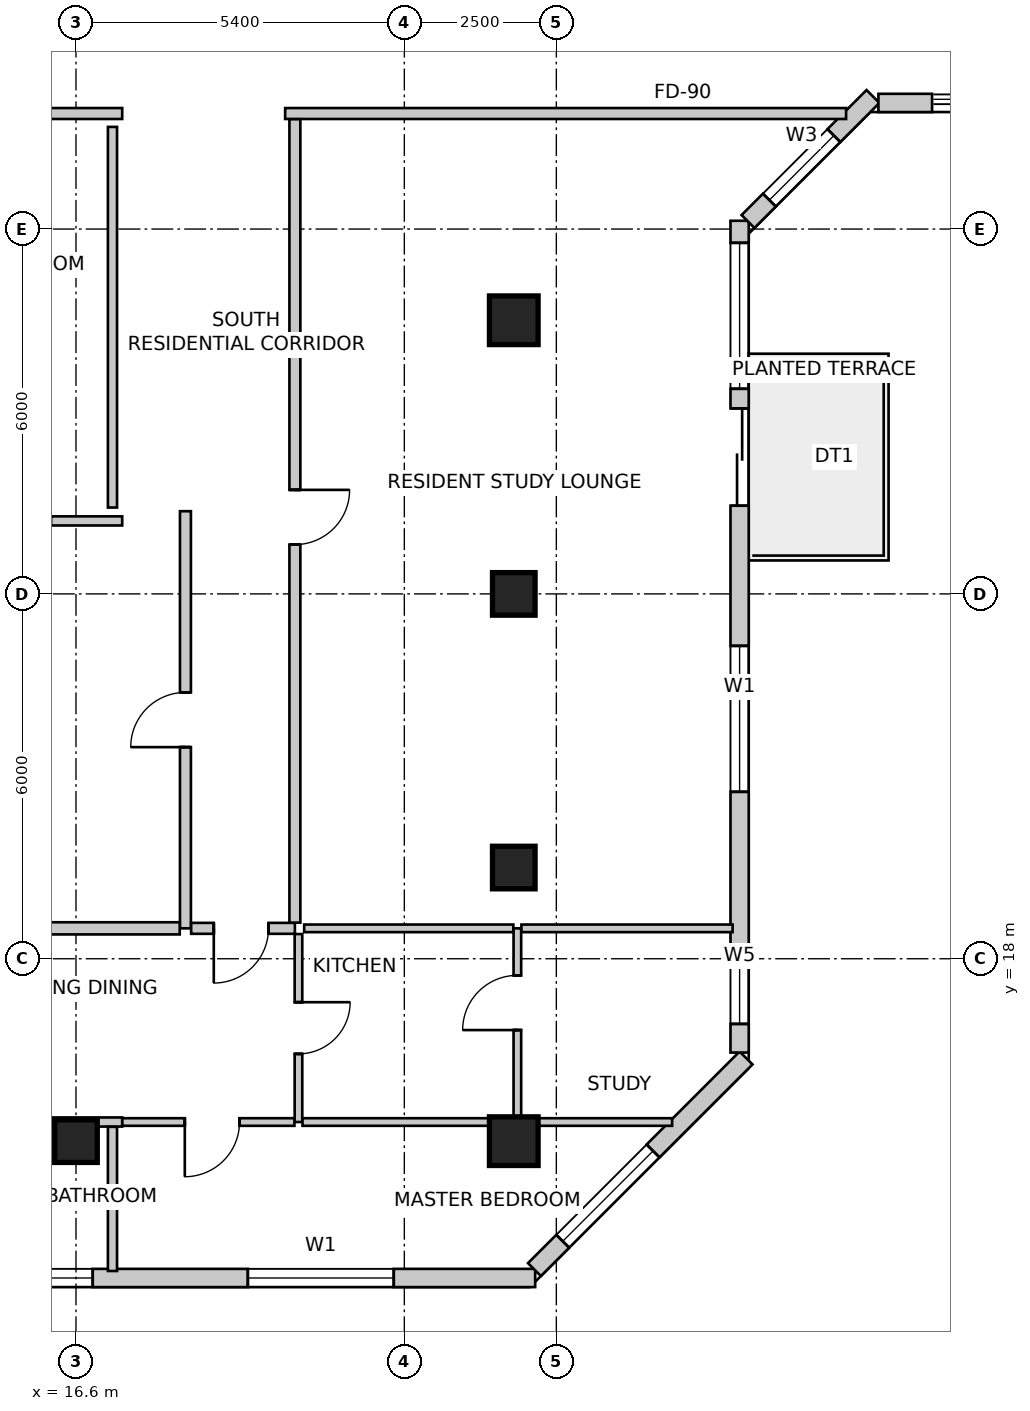
"""IFC4 building model, lengths in metres.
Left out: names, types, materials, properties, quantities, classifications, styles, units other than length and angle.
Written with IfcOpenShell. Run it as: python <this file> out.ifc"""

import sys

from ifc_helpers import new_model, si_unit, direction, frame, frame_2d, origin, origin_2d, place, context, subcontext, project, spatial, rectangle, extrude, source, transform, mapped, element, fill, save


model = new_model("IFC4")
c1 = context("Model", 3, precision=1e-05, world=origin(), true_north=direction((0.0, 1.0)))
c2 = subcontext(c1, "Body", "Model", "MODEL_VIEW")
j1 = project(units=[si_unit("LENGTHUNIT", "METRE"), si_unit("PLANEANGLEUNIT", "RADIAN")], contexts=[c1])
p1 = place(None, origin())
s1 = spatial("IfcSite", under=j1, at=p1, CompositionType="ELEMENT")
p2 = place(p1, origin())
s2 = spatial("IfcBuilding", under=s1, at=p2, CompositionType="ELEMENT")
p3 = place(p2, frame((0.0, 0.0, 200.9)))
s3 = spatial("IfcBuildingStorey", under=s2, at=p3, CompositionType="ELEMENT", Elevation=200.9)
m1 = source(origin(), c2, "Body", "SweptSolid", [
    extrude(rectangle(XDim=0.8, YDim=0.8, at=origin_2d()), origin(), (0.0, 0.0, 1.0), 3.5),
])
p4 = place(p3, frame((23.8, 28.5, 0.0), z_axis=(0.0, 0.0, 1.0), x_axis=(1.0, 0.0, 0.0)))
e1 = element("IfcColumn", 1, at=p4, inside=s3, PredefinedType="COLUMN", context=c2, shape_type="MappedRepresentation", body=[
    mapped(m1, transform((0.0, 0.0, 0.0), scale=1.0)),
])
m2 = source(origin(), c2, "Body", "SweptSolid", [
    extrude(rectangle(XDim=0.7, YDim=0.7, at=origin_2d()), origin(), (0.0, 0.0, 1.0), 3.5),
])
for number, where, z_axis, x_axis in (
    (2, (23.8, 24.0, 0.0), (0.0, 0.0, 1.0), (1.0, 0.0, 0.0)),
    (3, (23.8, 19.5, 0.0), (0.0, 0.0, 1.0), (1.0, 0.0, 0.0)),
):
    element("IfcColumn", number, at=place(p3, frame(where, z_axis=z_axis, x_axis=x_axis)), inside=s3, PredefinedType="COLUMN", context=c2, shape_type="MappedRepresentation", body=[
        mapped(m2, transform((0.0, 0.0, 0.0), scale=1.0)),
    ])
p5 = place(p3, frame((23.8, 15.0, 0.0), z_axis=(0.0, 0.0, 1.0), x_axis=(1.0, 0.0, 0.0)))
e4 = element("IfcColumn", 4, at=p5, inside=s3, PredefinedType="COLUMN", context=c2, shape_type="MappedRepresentation", body=[
    mapped(m1, transform((0.0, 0.0, 0.0), scale=1.0)),
])
p6 = place(p3, frame((16.6, 15.0, 0.0), z_axis=(0.0, 0.0, 1.0), x_axis=(1.0, 0.0, 0.0)))
e5 = element("IfcColumn", 5, at=p6, inside=s3, PredefinedType="COLUMN", context=c2, shape_type="MappedRepresentation", body=[
    mapped(m2, transform((0.0, 0.0, 0.0), scale=1.0)),
])
p7 = place(p3, frame((13.51, 12.75, 0.0), z_axis=(0.0, 0.0, 1.0), x_axis=(1.0, 0.0, 0.0)))
e6 = element("IfcWall", 6, at=p7, inside=s3, PredefinedType="SOLIDWALL", context=c2, shape_type="SweptSolid", body=[
    extrude(rectangle(XDim=10.642, YDim=0.3, at=frame_2d((5.321, 0.0))), origin(), (0.0, 0.0, 1.0), 3.25),
])
m3 = source(origin(), c2, "Body", "SweptSolid", [
    extrude(rectangle(XDim=2.1, YDim=2.0, at=frame_2d((1.05, 1.0))), frame((0.0, 0.16, 0.0), z_axis=(0.0, -1.0, 0.0), x_axis=(1.0, 0.0, 0.0)), (0.0, 0.0, 1.0), 0.32),
])
p8 = place(p7, frame((1.265, 0.0, 0.85)))
e7 = element("IfcOpeningElement", 7, at=p8, cuts=e6, PredefinedType="OPENING", context=c2, shape_type="MappedRepresentation", body=[
    mapped(m3, transform((0.0, 0.0, 0.0), scale=1.0)),
])
m4 = source(origin(), c2, "Body", "SweptSolid", [
    extrude(rectangle(XDim=2.4, YDim=2.2, at=frame_2d((1.2, 1.1))), frame((0.0, 0.16, 0.0), z_axis=(0.0, -1.0, 0.0), x_axis=(1.0, 0.0, 0.0)), (0.0, 0.0, 1.0), 0.32),
])
p9 = place(p7, frame((5.916, 0.0, 0.85)))
e8 = element("IfcOpeningElement", 8, at=p9, cuts=e6, PredefinedType="OPENING", context=c2, shape_type="MappedRepresentation", body=[
    mapped(m4, transform((0.0, 0.0, 0.0), scale=1.0)),
])
p10 = place(p3, frame((24.14, 12.888, 0.0), z_axis=(0.0, 0.0, 1.0), x_axis=(0.707106781187, 0.707106781187, 0.0)))
e9 = element("IfcWall", 9, at=p10, inside=s3, PredefinedType="SOLIDWALL", context=c2, shape_type="SweptSolid", body=[
    extrude(rectangle(XDim=4.922, YDim=0.3, at=frame_2d((2.461, 0.0))), origin(), (0.0, 0.0, 1.0), 3.25),
])
p11 = place(p10, frame((0.659, 0.0, 0.85)))
e10 = element("IfcOpeningElement", 10, at=p11, cuts=e9, PredefinedType="OPENING", context=c2, shape_type="MappedRepresentation", body=[
    mapped(m3, transform((0.0, 0.0, 0.0), scale=1.0)),
])
p12 = place(p3, frame((27.514, 16.457, 0.0), z_axis=(0.0, 0.0, 1.0), x_axis=(0.0, 1.0, 0.0)))
e11 = element("IfcWall", 11, at=p12, inside=s3, PredefinedType="SOLIDWALL", context=c2, shape_type="SweptSolid", body=[
    extrude(rectangle(XDim=13.679, YDim=0.3, at=frame_2d((6.839, 0.0))), origin(), (0.0, 0.0, 1.0), 3.25),
])
m5 = source(origin(), c2, "Body", "SweptSolid", [
    extrude(rectangle(XDim=1.6, YDim=2.15, at=frame_2d((0.8, 1.075))), frame((0.0, 0.16, 0.0), z_axis=(0.0, -1.0, 0.0), x_axis=(1.0, 0.0, 0.0)), (0.0, 0.0, 1.0), 0.32),
])
p13 = place(p12, frame((8.993, 0.0, 0.0)))
e12 = element("IfcOpeningElement", 12, at=p13, cuts=e11, PredefinedType="OPENING", context=c2, shape_type="MappedRepresentation", body=[
    mapped(m5, transform((0.0, 0.0, 0.0), scale=1.0)),
])
m6 = source(origin(), c2, "Body", "SweptSolid", [
    extrude(rectangle(XDim=1.2, YDim=1.6, at=frame_2d((0.6, 0.8))), frame((0.0, 0.16, 0.0), z_axis=(0.0, -1.0, 0.0), x_axis=(1.0, 0.0, 0.0)), (0.0, 0.0, 1.0), 0.32),
])
p14 = place(p12, frame((0.471, 0.0, 0.85)))
e13 = element("IfcOpeningElement", 13, at=p14, cuts=e11, PredefinedType="OPENING", context=c2, shape_type="MappedRepresentation", body=[
    mapped(m6, transform((0.0, 0.0, 0.0), scale=1.0)),
])
p15 = place(p12, frame((4.288, 0.0, 0.85)))
e14 = element("IfcOpeningElement", 14, at=p15, cuts=e11, PredefinedType="OPENING", context=c2, shape_type="MappedRepresentation", body=[
    mapped(m4, transform((0.0, 0.0, 0.0), scale=1.0)),
])
p16 = place(p12, frame((10.916, 0.0, 0.85)))
e15 = element("IfcOpeningElement", 15, at=p16, cuts=e11, PredefinedType="OPENING", context=c2, shape_type="MappedRepresentation", body=[
    mapped(m4, transform((0.0, 0.0, 0.0), scale=1.0)),
])
p17 = place(p3, frame((27.652, 30.124, 0.0), z_axis=(0.0, 0.0, 1.0), x_axis=(0.707064797706, 0.707148762175, 0.0)))
e16 = element("IfcWall", 16, at=p17, inside=s3, PredefinedType="SOLIDWALL", context=c2, shape_type="SweptSolid", body=[
    extrude(rectangle(XDim=2.908, YDim=0.3, at=frame_2d((1.454, 0.0))), origin(), (0.0, 0.0, 1.0), 3.25),
])
m7 = source(origin(), c2, "Body", "SweptSolid", [
    extrude(rectangle(XDim=1.5, YDim=1.8, at=frame_2d((0.75, 0.9))), frame((0.0, 0.16, 0.0), z_axis=(0.0, -1.0, 0.0), x_axis=(1.0, 0.0, 0.0)), (0.0, 0.0, 1.0), 0.32),
])
p18 = place(p17, frame((0.498, 0.0, 0.85)))
e17 = element("IfcOpeningElement", 17, at=p18, cuts=e16, PredefinedType="OPENING", context=c2, shape_type="MappedRepresentation", body=[
    mapped(m7, transform((0.0, 0.0, 0.0), scale=1.0)),
])
p19 = place(p3, frame((29.797, 32.074, 0.0), z_axis=(0.0, 0.0, 1.0), x_axis=(1.0, 0.0, 0.0)))
e18 = element("IfcWall", 18, at=p19, inside=s3, PredefinedType="SOLIDWALL", context=c2, shape_type="SweptSolid", body=[
    extrude(rectangle(XDim=0.882, YDim=0.3, at=frame_2d((0.441, 0.0))), origin(), (0.0, 0.0, 1.0), 3.25),
])
p20 = place(p3, frame((17.36, 31.9, 0.0), z_axis=(0.0, 0.0, 1.0), x_axis=(-1.0, 0.0, 0.0)))
e19 = element("IfcWall", 19, at=p20, inside=s3, PredefinedType="PARTITIONING", context=c2, shape_type="SweptSolid", body=[
    extrude(rectangle(XDim=3.07, YDim=0.18, at=frame_2d((1.535, 0.0))), origin(), (0.0, 0.0, 1.0), 2.934),
])
p21 = place(p3, frame((29.265, 31.9, 0.0), z_axis=(0.0, 0.0, 1.0), x_axis=(-1.0, 0.0, 0.0)))
e20 = element("IfcWall", 20, at=p21, inside=s3, PredefinedType="PARTITIONING", context=c2, shape_type="SweptSolid", body=[
    extrude(rectangle(XDim=9.225, YDim=0.18, at=frame_2d((4.613, 0.0))), origin(), (0.0, 0.0, 1.0), 2.934),
])
p22 = place(p3, frame((18.4, 18.5, 0.0), z_axis=(0.0, 0.0, 1.0), x_axis=(0.0, 1.0, 0.0)))
e21 = element("IfcWall", 21, at=p22, inside=s3, PredefinedType="PARTITIONING", context=c2, shape_type="SweptSolid", body=[
    extrude(rectangle(XDim=6.86, YDim=0.18, at=frame_2d((3.43, 0.0))), origin(), (0.0, 0.0, 1.0), 2.766),
])
m8 = source(origin(), c2, "Body", "SweptSolid", [
    extrude(rectangle(XDim=0.9, YDim=2.15, at=frame_2d((0.45, 1.075))), frame((0.0, 0.1, 0.0), z_axis=(0.0, -1.0, 0.0), x_axis=(1.0, 0.0, 0.0)), (0.0, 0.0, 1.0), 0.2),
])
p23 = place(p22, frame((2.98, 0.0, 0.0)))
e22 = element("IfcOpeningElement", 22, at=p23, cuts=e21, PredefinedType="OPENING", context=c2, shape_type="MappedRepresentation", body=[
    mapped(m8, transform((0.0, 0.0, 0.0), scale=1.0)),
])
p24 = place(p3, frame((20.2, 18.5, 0.0), z_axis=(0.0, 0.0, 1.0), x_axis=(-1.0, 0.0, 0.0)))
e23 = element("IfcWall", 23, at=p24, inside=s3, PredefinedType="PARTITIONING", context=c2, shape_type="SweptSolid", body=[
    extrude(rectangle(XDim=1.706, YDim=0.18, at=frame_2d((0.853, 0.0))), origin(), (0.0, 0.0, 1.0), 3.25),
])
p25 = place(p24, frame((0.434, 0.0, 0.0)))
e24 = element("IfcOpeningElement", 24, at=p25, cuts=e23, PredefinedType="OPENING", context=c2, shape_type="MappedRepresentation", body=[
    mapped(m8, transform((0.0, 0.0, 0.0), scale=1.0)),
])
p26 = place(p3, frame((20.2, 31.806, 0.0), z_axis=(0.0, 0.0, 1.0), x_axis=(0.0, -1.0, 0.0)))
e25 = element("IfcWall", 25, at=p26, inside=s3, PredefinedType="PARTITIONING", context=c2, shape_type="SweptSolid", body=[
    extrude(rectangle(XDim=13.212, YDim=0.18, at=frame_2d((6.606, 0.0))), origin(), (0.0, 0.0, 1.0), 2.766),
])
p27 = place(p26, frame((6.095, 0.0, 0.0)))
e26 = element("IfcOpeningElement", 26, at=p27, cuts=e25, PredefinedType="OPENING", context=c2, shape_type="MappedRepresentation", body=[
    mapped(m8, transform((0.0, 0.0, 0.0), scale=1.0)),
])
p28 = place(p3, frame((14.29, 25.2, 0.0), z_axis=(0.0, 0.0, 1.0), x_axis=(1.0, 0.0, 0.0)))
e27 = element("IfcWall", 27, at=p28, inside=s3, PredefinedType="PARTITIONING", context=c2, shape_type="SweptSolid", body=[
    extrude(rectangle(XDim=3.07, YDim=0.15, at=frame_2d((1.535, 0.0))), origin(), (0.0, 0.0, 1.0), 2.822),
])
m9 = source(origin(), c2, "Body", "SweptSolid", [
    extrude(rectangle(XDim=0.85, YDim=2.15, at=frame_2d((0.425, 1.075))), frame((0.0, 0.085, 0.0), z_axis=(0.0, -1.0, 0.0), x_axis=(1.0, 0.0, 0.0)), (0.0, 0.0, 1.0), 0.17),
])
p29 = place(p28, frame((1.046, 0.0, 0.0)))
e28 = element("IfcOpeningElement", 28, at=p29, cuts=e27, PredefinedType="OPENING", context=c2, shape_type="MappedRepresentation", body=[
    mapped(m9, transform((0.0, 0.0, 0.0), scale=1.0)),
])
p30 = place(p3, frame((18.306, 18.5, 0.0), z_axis=(0.0, 0.0, 1.0), x_axis=(-1.0, 0.0, 0.0)))
e29 = element("IfcWall", 29, at=p30, inside=s3, PredefinedType="PARTITIONING", context=c2, shape_type="SweptSolid", body=[
    extrude(rectangle(XDim=7.246, YDim=0.2, at=frame_2d((3.623, 0.0))), origin(), (0.0, 0.0, 1.0), 3.25),
])
p31 = place(p3, frame((23.859, 15.315, 0.0), z_axis=(0.0, 0.0, 1.0), x_axis=(0.0, 1.0, 0.0)))
e30 = element("IfcWall", 30, at=p31, inside=s3, PredefinedType="PARTITIONING", context=c2, shape_type="SweptSolid", body=[
    extrude(rectangle(XDim=3.185, YDim=0.125, at=frame_2d((1.593, 0.0))), origin(), (0.0, 0.0, 1.0), 2.542),
])
m10 = source(origin(), c2, "Body", "SweptSolid", [
    extrude(rectangle(XDim=0.9, YDim=2.15, at=frame_2d((0.45, 1.075))), frame((0.0, 0.073, 0.0), z_axis=(0.0, -1.0, 0.0), x_axis=(1.0, 0.0, 0.0)), (0.0, 0.0, 1.0), 0.145),
])
p32 = place(p31, frame((1.512, 0.0, 0.0)))
e31 = element("IfcOpeningElement", 31, at=p32, cuts=e30, PredefinedType="OPENING", context=c2, shape_type="MappedRepresentation", body=[
    mapped(m10, transform((0.0, 0.0, 0.0), scale=1.0)),
])
p33 = place(p3, frame((26.404, 15.315, 0.0), z_axis=(0.0, 0.0, 1.0), x_axis=(-1.0, 0.0, 0.0)))
e32 = element("IfcWall", 32, at=p33, inside=s3, PredefinedType="PARTITIONING", context=c2, shape_type="SweptSolid", body=[
    extrude(rectangle(XDim=2.479, YDim=0.125, at=frame_2d((1.239, 0.0))), origin(), (0.0, 0.0, 1.0), 3.25),
])
p34 = place(p3, frame((23.926, 18.5, 0.0), z_axis=(0.0, 0.0, 1.0), x_axis=(1.0, 0.0, 0.0)))
e33 = element("IfcWall", 33, at=p34, inside=s3, PredefinedType="PARTITIONING", context=c2, shape_type="SweptSolid", body=[
    extrude(rectangle(XDim=3.473, YDim=0.125, at=frame_2d((1.737, 0.0))), origin(), (0.0, 0.0, 1.0), 3.25),
])
p35 = place(p3, frame((20.259, 18.406, 0.0), z_axis=(0.0, 0.0, 1.0), x_axis=(0.0, -1.0, 0.0)))
e34 = element("IfcWall", 34, at=p35, inside=s3, PredefinedType="PARTITIONING", context=c2, shape_type="SweptSolid", body=[
    extrude(rectangle(XDim=3.091, YDim=0.125, at=frame_2d((1.545, 0.0))), origin(), (0.0, 0.0, 1.0), 2.822),
])
m11 = source(origin(), c2, "Body", "SweptSolid", [
    extrude(rectangle(XDim=0.85, YDim=2.15, at=frame_2d((0.425, 1.075))), frame((0.0, 0.073, 0.0), z_axis=(0.0, -1.0, 0.0), x_axis=(1.0, 0.0, 0.0)), (0.0, 0.0, 1.0), 0.145),
])
p36 = place(p35, frame((1.121, 0.0, 0.0)))
e35 = element("IfcOpeningElement", 35, at=p36, cuts=e34, PredefinedType="OPENING", context=c2, shape_type="MappedRepresentation", body=[
    mapped(m11, transform((0.0, 0.0, 0.0), scale=1.0)),
])
p37 = place(p3, frame((17.36, 15.315, 0.0), z_axis=(0.0, 0.0, 1.0), x_axis=(-1.0, 0.0, 0.0)))
e36 = element("IfcWall", 36, at=p37, inside=s3, PredefinedType="PARTITIONING", context=c2, shape_type="SweptSolid", body=[
    extrude(rectangle(XDim=3.07, YDim=0.15, at=frame_2d((1.535, 0.0))), origin(), (0.0, 0.0, 1.0), 2.822),
])
p38 = place(p37, frame((1.685, 0.0, 0.0)))
e37 = element("IfcOpeningElement", 37, at=p38, cuts=e36, PredefinedType="OPENING", context=c2, shape_type="MappedRepresentation", body=[
    mapped(m9, transform((0.0, 0.0, 0.0), scale=1.0)),
])
p39 = place(p3, frame((20.192, 15.315, 0.0), z_axis=(0.0, 0.0, 1.0), x_axis=(-1.0, 0.0, 0.0)))
e38 = element("IfcWall", 38, at=p39, inside=s3, PredefinedType="PARTITIONING", context=c2, shape_type="SweptSolid", body=[
    extrude(rectangle(XDim=2.83, YDim=0.125, at=frame_2d((1.415, 0.0))), origin(), (0.0, 0.0, 1.0), 3.25),
])
p40 = place(p39, frame((0.903, 0.0, 0.0)))
e39 = element("IfcOpeningElement", 39, at=p40, cuts=e38, PredefinedType="OPENING", context=c2, shape_type="MappedRepresentation", body=[
    mapped(m10, transform((0.0, 0.0, 0.0), scale=1.0)),
])
p41 = place(p3, frame((23.792, 15.315, 0.0), z_axis=(0.0, 0.0, 1.0), x_axis=(-1.0, 0.0, 0.0)))
e40 = element("IfcWall", 40, at=p41, inside=s3, PredefinedType="PARTITIONING", context=c2, shape_type="SweptSolid", body=[
    extrude(rectangle(XDim=3.467, YDim=0.125, at=frame_2d((1.733, 0.0))), origin(), (0.0, 0.0, 1.0), 2.542),
])
p42 = place(p3, frame((20.353, 18.5, 0.0), z_axis=(0.0, 0.0, 1.0), x_axis=(1.0, 0.0, 0.0)))
e41 = element("IfcWall", 41, at=p42, inside=s3, PredefinedType="PARTITIONING", context=c2, shape_type="SweptSolid", body=[
    extrude(rectangle(XDim=3.439, YDim=0.125, at=frame_2d((1.72, 0.0))), origin(), (0.0, 0.0, 1.0), 2.542),
])
p43 = place(p3, frame((17.2, 15.236, 0.0), z_axis=(0.0, 0.0, 1.0), x_axis=(0.0, -1.0, 0.0)))
e42 = element("IfcWall", 42, at=p43, inside=s3, PredefinedType="PARTITIONING", context=c2, shape_type="SweptSolid", body=[
    extrude(rectangle(XDim=2.371, YDim=0.15, at=frame_2d((1.186, 0.0))), origin(), (0.0, 0.0, 1.0), 2.542),
])
p44 = place(p3, frame((17.2, 31.68, 0.0), z_axis=(0.0, 0.0, 1.0), x_axis=(0.0, -1.0, 0.0)))
e43 = element("IfcWall", 43, at=p44, inside=s3, PredefinedType="PARTITIONING", context=c2, shape_type="SweptSolid", body=[
    extrude(rectangle(XDim=6.26, YDim=0.15, at=frame_2d((3.13, 0.0))), origin(), (0.0, 0.0, 1.0), 2.766),
])
m12 = source(origin(), c2, "Body", "SweptSolid", [
    extrude(rectangle(XDim=2.1, YDim=2.0, at=frame_2d((1.05, 1.0))), frame((0.0, -0.015, 0.0), z_axis=(0.0, -1.0, 0.0), x_axis=(1.0, 0.0, 0.0)), (0.0, 0.0, 1.0), 0.06),
])
p45 = place(p8, origin())
e44 = element("IfcWindow", 44, at=p45, inside=s3, PartitioningType="SINGLE_PANEL", PredefinedType="WINDOW", context=c2, shape_type="MappedRepresentation", body=[
    mapped(m12, transform((0.0, 0.0, 0.0), scale=1.0)),
])
fill(e7, e44)
m13 = source(origin(), c2, "Body", "SweptSolid", [
    extrude(rectangle(XDim=2.4, YDim=2.2, at=frame_2d((1.2, 1.1))), frame((0.0, -0.015, 0.0), z_axis=(0.0, -1.0, 0.0), x_axis=(1.0, 0.0, 0.0)), (0.0, 0.0, 1.0), 0.06),
])
p46 = place(p9, origin())
e45 = element("IfcWindow", 45, at=p46, inside=s3, PartitioningType="SINGLE_PANEL", PredefinedType="WINDOW", context=c2, shape_type="MappedRepresentation", body=[
    mapped(m13, transform((0.0, 0.0, 0.0), scale=1.0)),
])
fill(e8, e45)
p47 = place(p11, origin())
e46 = element("IfcWindow", 46, at=p47, inside=s3, PartitioningType="SINGLE_PANEL", PredefinedType="WINDOW", context=c2, shape_type="MappedRepresentation", body=[
    mapped(m12, transform((0.0, 0.0, 0.0), scale=1.0)),
])
fill(e10, e46)
m14 = source(origin(), c2, "Body", "SweptSolid", [
    extrude(rectangle(XDim=1.6, YDim=2.15, at=frame_2d((0.8, 1.075))), frame((0.0, 0.025, 0.0), z_axis=(0.0, -1.0, 0.0), x_axis=(1.0, 0.0, 0.0)), (0.0, 0.0, 1.0), 0.05),
])
p48 = place(p13, origin())
e47 = element("IfcDoor", 47, at=p48, inside=s3, OperationType="DOUBLE_DOOR_SLIDING", PredefinedType="DOOR", context=c2, shape_type="MappedRepresentation", body=[
    mapped(m14, transform((0.0, 0.0, 0.0), scale=1.0)),
])
fill(e12, e47)
m15 = source(origin(), c2, "Body", "SweptSolid", [
    extrude(rectangle(XDim=1.2, YDim=1.6, at=frame_2d((0.6, 0.8))), frame((0.0, -0.015, 0.0), z_axis=(0.0, -1.0, 0.0), x_axis=(1.0, 0.0, 0.0)), (0.0, 0.0, 1.0), 0.06),
])
p49 = place(p14, origin())
e48 = element("IfcWindow", 48, at=p49, inside=s3, PartitioningType="SINGLE_PANEL", PredefinedType="WINDOW", context=c2, shape_type="MappedRepresentation", body=[
    mapped(m15, transform((0.0, 0.0, 0.0), scale=1.0)),
])
fill(e13, e48)
p50 = place(p15, origin())
e49 = element("IfcWindow", 49, at=p50, inside=s3, PartitioningType="SINGLE_PANEL", PredefinedType="WINDOW", context=c2, shape_type="MappedRepresentation", body=[
    mapped(m13, transform((0.0, 0.0, 0.0), scale=1.0)),
])
fill(e14, e49)
p51 = place(p16, origin())
e50 = element("IfcWindow", 50, at=p51, inside=s3, PartitioningType="SINGLE_PANEL", PredefinedType="WINDOW", context=c2, shape_type="MappedRepresentation", body=[
    mapped(m13, transform((0.0, 0.0, 0.0), scale=1.0)),
])
fill(e15, e50)
m16 = source(origin(), c2, "Body", "SweptSolid", [
    extrude(rectangle(XDim=1.5, YDim=1.8, at=frame_2d((0.75, 0.9))), frame((0.0, -0.015, 0.0), z_axis=(0.0, -1.0, 0.0), x_axis=(1.0, 0.0, 0.0)), (0.0, 0.0, 1.0), 0.06),
])
p52 = place(p18, origin())
e51 = element("IfcWindow", 51, at=p52, inside=s3, PartitioningType="SINGLE_PANEL", PredefinedType="WINDOW", context=c2, shape_type="MappedRepresentation", body=[
    mapped(m16, transform((0.0, 0.0, 0.0), scale=1.0)),
])
fill(e17, e51)
m17 = source(origin(), c2, "Body", "SweptSolid", [
    extrude(rectangle(XDim=0.9, YDim=2.15, at=frame_2d((0.45, 1.075))), frame((0.0, 0.025, 0.0), z_axis=(0.0, -1.0, 0.0), x_axis=(1.0, 0.0, 0.0)), (0.0, 0.0, 1.0), 0.05),
])
p53 = place(p23, origin())
e52 = element("IfcDoor", 52, at=p53, inside=s3, OperationType="SINGLE_SWING_LEFT", PredefinedType="DOOR", context=c2, shape_type="MappedRepresentation", body=[
    mapped(m17, transform((0.0, 0.0, 0.0), scale=1.0)),
])
fill(e22, e52)
m18 = source(origin(), c2, "Body", "SweptSolid", [
    extrude(rectangle(XDim=0.9, YDim=2.15, at=frame_2d((0.45, 1.075))), frame((0.0, 0.025, 0.0), z_axis=(0.0, -1.0, 0.0), x_axis=(1.0, 0.0, 0.0)), (0.0, 0.0, 1.0), 0.05),
])
p54 = place(p32, origin())
e53 = element("IfcDoor", 53, at=p54, inside=s3, OperationType="SINGLE_SWING_LEFT", PredefinedType="DOOR", context=c2, shape_type="MappedRepresentation", body=[
    mapped(m18, transform((0.0, 0.0, 0.0), scale=1.0)),
])
fill(e31, e53)
p55 = place(p25, origin())
e54 = element("IfcDoor", 54, at=p55, inside=s3, OperationType="SINGLE_SWING_RIGHT", PredefinedType="DOOR", context=c2, shape_type="MappedRepresentation", body=[
    mapped(m17, transform((0.0, 0.0, 0.0), scale=1.0)),
])
fill(e24, e54)
m19 = source(origin(), c2, "Body", "SweptSolid", [
    extrude(rectangle(XDim=0.85, YDim=2.15, at=frame_2d((0.425, 1.075))), frame((0.0, 0.025, 0.0), z_axis=(0.0, -1.0, 0.0), x_axis=(1.0, 0.0, 0.0)), (0.0, 0.0, 1.0), 0.05),
])
p56 = place(p36, origin())
e55 = element("IfcDoor", 55, at=p56, inside=s3, OperationType="SINGLE_SWING_LEFT", PredefinedType="DOOR", context=c2, shape_type="MappedRepresentation", body=[
    mapped(m19, transform((0.0, 0.0, 0.0), scale=1.0)),
])
fill(e35, e55)
p57 = place(p40, origin())
e56 = element("IfcDoor", 56, at=p57, inside=s3, OperationType="SINGLE_SWING_RIGHT", PredefinedType="DOOR", context=c2, shape_type="MappedRepresentation", body=[
    mapped(m18, transform((0.0, 0.0, 0.0), scale=1.0)),
])
fill(e39, e56)
p58 = place(p27, origin())
e57 = element("IfcDoor", 57, at=p58, inside=s3, OperationType="SINGLE_SWING_LEFT", PredefinedType="DOOR", context=c2, shape_type="MappedRepresentation", body=[
    mapped(m18, transform((0.0, 0.0, 0.0), scale=1.0)),
])
fill(e26, e57)
save(model, sys.argv[1])
